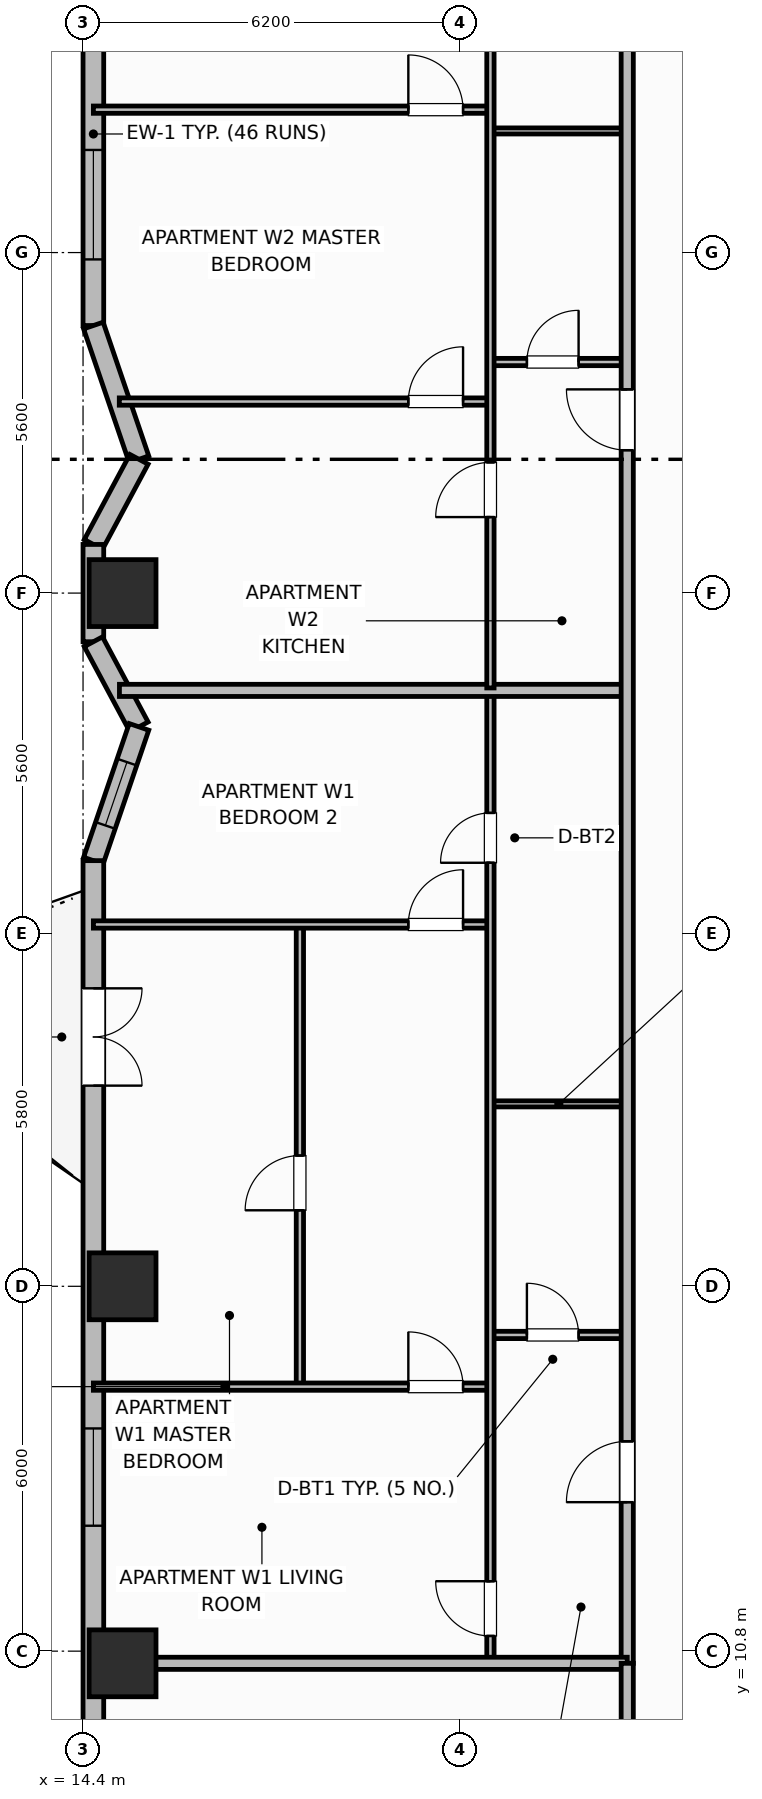
"""IFC4 building model, lengths in metres.
Left out: names, types, materials, properties, quantities, classifications, styles, units other than length and angle.
Written with IfcOpenShell. Run it as: python <this file> out.ifc"""

import sys

from ifc_helpers import new_model, si_unit, direction, frame, frame_2d, origin, origin_2d, place, context, subcontext, project, spatial, rectangle, extrude, element, fill, save


model = new_model("IFC4")
c1 = context("Model", 3, precision=1e-05, world=origin(), true_north=direction((0.0, 1.0)))
c2 = subcontext(c1, "Body", "Model", "MODEL_VIEW")
j1 = project(units=[si_unit("LENGTHUNIT", "METRE"), si_unit("PLANEANGLEUNIT", "RADIAN")], contexts=[c1])
p1 = place(None, origin())
s1 = spatial("IfcSite", under=j1, at=p1, CompositionType="ELEMENT")
p2 = place(p1, origin())
s2 = spatial("IfcBuilding", under=s1, at=p2, CompositionType="ELEMENT")
p3 = place(p2, frame((0.0, 0.0, 125.3)))
s3 = spatial("IfcBuildingStorey", under=s2, at=p3, CompositionType="ELEMENT", Elevation=125.3)
for number, where, z_axis, x_axis in (
    (1, (15.05, 10.6, 0.0), (0.0, 0.0, 1.0), (1.0, 0.0, 0.0)),
    (2, (15.05, 16.8, 0.0), (0.0, 0.0, 1.0), (1.0, 0.0, 0.0)),
    (3, (15.05, 28.2, 0.0), (0.0, 0.0, 1.0), (1.0, 0.0, 0.0)),
):
    element("IfcColumn", number, at=place(p3, frame(where, z_axis=z_axis, x_axis=x_axis)), inside=s3, PredefinedType="COLUMN", context=c2, shape_type="SweptSolid", body=[
        extrude(rectangle(XDim=1.1, YDim=1.1, at=origin_2d()), origin(), (0.0, 0.0, 1.0), 3.7),
    ])
p4 = place(p3, frame((14.57, 47.4, 0.0), z_axis=(0.0, 0.0, 1.0), x_axis=(0.0, -1.0, 0.0)))
e4 = element("IfcWall", 4, at=p4, inside=s3, PredefinedType="SOLIDWALL", context=c2, shape_type="SweptSolid", body=[
    extrude(rectangle(XDim=14.8, YDim=0.34, at=frame_2d((7.4, 0.0))), origin(), (0.0, 0.0, 1.0), 2.7),
])
p5 = place(p4, frame((3.762, 0.0, 0.73)))
e5 = element("IfcOpeningElement", 5, at=p5, cuts=e4, PredefinedType="OPENING", context=c2, shape_type="SweptSolid", body=[
    extrude(rectangle(XDim=1.8, YDim=1.85, at=frame_2d((0.9, 0.925))), frame((0.0, 0.18, 0.0), z_axis=(0.0, -1.0, 0.0), x_axis=(1.0, 0.0, 0.0)), (0.0, 0.0, 1.0), 0.36),
])
p6 = place(p4, frame((8.4, 0.0, 0.69)))
e6 = element("IfcOpeningElement", 6, at=p6, cuts=e4, PredefinedType="OPENING", context=c2, shape_type="SweptSolid", body=[
    extrude(rectangle(XDim=1.4, YDim=1.85, at=frame_2d((0.7, 0.925))), frame((0.0, 0.18, 0.0), z_axis=(0.0, -1.0, 0.0), x_axis=(1.0, 0.0, 0.0)), (0.0, 0.0, 1.0), 0.36),
])
p7 = place(p4, frame((11.913, 0.0, 0.73)))
e7 = element("IfcOpeningElement", 7, at=p7, cuts=e4, PredefinedType="OPENING", context=c2, shape_type="SweptSolid", body=[
    extrude(rectangle(XDim=1.8, YDim=1.85, at=frame_2d((0.9, 0.925))), frame((0.0, 0.18, 0.0), z_axis=(0.0, -1.0, 0.0), x_axis=(1.0, 0.0, 0.0)), (0.0, 0.0, 1.0), 0.36),
])
p8 = place(p3, frame((14.57, 32.6, 0.0), z_axis=(0.0, 0.0, 1.0), x_axis=(0.32264826586, -0.946518936175, 0.0)))
e8 = element("IfcWall", 8, at=p8, inside=s3, PredefinedType="SOLIDWALL", context=c2, shape_type="SweptSolid", body=[
    extrude(rectangle(XDim=2.324, YDim=0.34, at=frame_2d((1.162, 0.0))), origin(), (0.0, 0.0, 1.0), 2.7),
])
p9 = place(p3, frame((15.32, 30.4, 0.0), z_axis=(0.0, 0.0, 1.0), x_axis=(-0.472247007964, -0.881466257703, 0.0)))
e9 = element("IfcWall", 9, at=p9, inside=s3, PredefinedType="SOLIDWALL", context=c2, shape_type="SweptSolid", body=[
    extrude(rectangle(XDim=1.588, YDim=0.34, at=frame_2d((0.794, 0.0))), origin(), (0.0, 0.0, 1.0), 2.7),
])
p10 = place(p3, frame((14.57, 29.0, 0.0), z_axis=(0.0, 0.0, 1.0), x_axis=(0.0, -1.0, 0.0)))
e10 = element("IfcWall", 10, at=p10, inside=s3, PredefinedType="SOLIDWALL", context=c2, shape_type="SweptSolid", body=[
    extrude(rectangle(XDim=1.6, YDim=0.34, at=frame_2d((0.8, 0.0))), origin(), (0.0, 0.0, 1.0), 2.7),
])
p11 = place(p3, frame((14.57, 27.4, 0.0), z_axis=(0.0, 0.0, 1.0), x_axis=(0.472247007964, -0.881466257703, 0.0)))
e11 = element("IfcWall", 11, at=p11, inside=s3, PredefinedType="SOLIDWALL", context=c2, shape_type="SweptSolid", body=[
    extrude(rectangle(XDim=1.588, YDim=0.34, at=frame_2d((0.794, 0.0))), origin(), (0.0, 0.0, 1.0), 2.7),
])
p12 = place(p3, frame((15.32, 26.0, 0.0), z_axis=(0.0, 0.0, 1.0), x_axis=(-0.322680343871, -0.946508000853, 0.0)))
e12 = element("IfcWall", 12, at=p12, inside=s3, PredefinedType="SOLIDWALL", context=c2, shape_type="SweptSolid", body=[
    extrude(rectangle(XDim=2.324, YDim=0.34, at=frame_2d((1.162, 0.0))), origin(), (0.0, 0.0, 1.0), 2.7),
])
p13 = place(p12, frame((0.612, 0.0, 0.89)))
e13 = element("IfcOpeningElement", 13, at=p13, cuts=e12, PredefinedType="OPENING", context=c2, shape_type="SweptSolid", body=[
    extrude(rectangle(XDim=1.1, YDim=1.65, at=frame_2d((0.55, 0.825))), frame((0.0, 0.18, 0.0), z_axis=(0.0, -1.0, 0.0), x_axis=(1.0, 0.0, 0.0)), (0.0, 0.0, 1.0), 0.36),
])
p14 = place(p3, frame((14.57, 23.8, 0.0), z_axis=(0.0, 0.0, 1.0), x_axis=(0.0, -1.0, 0.0)))
e14 = element("IfcWall", 14, at=p14, inside=s3, PredefinedType="SOLIDWALL", context=c2, shape_type="SweptSolid", body=[
    extrude(rectangle(XDim=14.8, YDim=0.34, at=frame_2d((7.4, 0.0))), origin(), (0.0, 0.0, 1.0), 2.7),
])
p15 = place(p14, frame((2.1, 0.0, 0.0)))
e15 = element("IfcOpeningElement", 15, at=p15, cuts=e14, PredefinedType="OPENING", context=c2, shape_type="SweptSolid", body=[
    extrude(rectangle(XDim=1.6, YDim=2.1, at=frame_2d((0.8, 1.05))), frame((0.0, 0.18, 0.0), z_axis=(0.0, -1.0, 0.0), x_axis=(1.0, 0.0, 0.0)), (0.0, 0.0, 1.0), 0.36),
])
p16 = place(p14, frame((9.337, 0.0, 0.68)))
e16 = element("IfcOpeningElement", 16, at=p16, cuts=e14, PredefinedType="OPENING", context=c2, shape_type="SweptSolid", body=[
    extrude(rectangle(XDim=1.6, YDim=1.9, at=frame_2d((0.8, 0.95))), frame((0.0, 0.18, 0.0), z_axis=(0.0, -1.0, 0.0), x_axis=(1.0, 0.0, 0.0)), (0.0, 0.0, 1.0), 0.36),
])
p17 = place(p3, frame((21.1, 16.0, 0.0), z_axis=(0.0, 0.0, 1.0), x_axis=(1.0, 0.0, 0.0)))
e17 = element("IfcWall", 17, at=p17, inside=s3, PredefinedType="PARTITIONING", context=c2, shape_type="SweptSolid", body=[
    extrude(rectangle(XDim=2.25, YDim=0.12, at=frame_2d((1.125, 0.0))), origin(), (0.0, 0.0, 1.0), 2.53),
])
p18 = place(p17, frame((0.6, 0.0, 0.0)))
e18 = element("IfcOpeningElement", 18, at=p18, cuts=e17, PredefinedType="OPENING", context=c2, shape_type="SweptSolid", body=[
    extrude(rectangle(XDim=0.85, YDim=2.1, at=frame_2d((0.425, 1.05))), frame((0.0, 0.07, 0.0), z_axis=(0.0, -1.0, 0.0), x_axis=(1.0, 0.0, 0.0)), (0.0, 0.0, 1.0), 0.14),
])
p19 = place(p3, frame((21.1, 19.8, 0.0), z_axis=(0.0, 0.0, 1.0), x_axis=(1.0, 0.0, 0.0)))
e19 = element("IfcWall", 19, at=p19, inside=s3, PredefinedType="PARTITIONING", context=c2, shape_type="SweptSolid", body=[
    extrude(rectangle(XDim=2.25, YDim=0.1, at=frame_2d((1.125, 0.0))), origin(), (0.0, 0.0, 1.0), 2.53),
])
p20 = place(p3, frame((17.966, 15.19, 0.0), z_axis=(0.0, 0.0, 1.0), x_axis=(0.0, 1.0, 0.0)))
e20 = element("IfcWall", 20, at=p20, inside=s3, PredefinedType="PARTITIONING", context=c2, shape_type="SweptSolid", body=[
    extrude(rectangle(XDim=7.52, YDim=0.12, at=frame_2d((3.76, 0.0))), origin(), (0.0, 0.0, 1.0), 2.53),
])
p21 = place(p20, frame((2.86, 0.0, 0.0)))
e21 = element("IfcOpeningElement", 21, at=p21, cuts=e20, PredefinedType="OPENING", context=c2, shape_type="SweptSolid", body=[
    extrude(rectangle(XDim=0.9, YDim=2.1, at=frame_2d((0.45, 1.05))), frame((0.0, 0.07, 0.0), z_axis=(0.0, -1.0, 0.0), x_axis=(1.0, 0.0, 0.0)), (0.0, 0.0, 1.0), 0.14),
])
p22 = place(p3, frame((14.57, 15.15, 0.0), z_axis=(0.0, 0.0, 1.0), x_axis=(1.0, 0.0, 0.0)))
e22 = element("IfcWall", 22, at=p22, inside=s3, PredefinedType="PARTITIONING", context=c2, shape_type="SweptSolid", body=[
    extrude(rectangle(XDim=6.53, YDim=0.12, at=frame_2d((3.265, 0.0))), origin(), (0.0, 0.0, 1.0), 2.53),
])
p23 = place(p22, frame((5.18, 0.0, 0.0)))
e23 = element("IfcOpeningElement", 23, at=p23, cuts=e22, PredefinedType="OPENING", context=c2, shape_type="SweptSolid", body=[
    extrude(rectangle(XDim=0.9, YDim=2.1, at=frame_2d((0.45, 1.05))), frame((0.0, 0.07, 0.0), z_axis=(0.0, -1.0, 0.0), x_axis=(1.0, 0.0, 0.0)), (0.0, 0.0, 1.0), 0.14),
])
p24 = place(p3, frame((14.57, 22.75, 0.0), z_axis=(0.0, 0.0, 1.0), x_axis=(1.0, 0.0, 0.0)))
e24 = element("IfcWall", 24, at=p24, inside=s3, PredefinedType="PARTITIONING", context=c2, shape_type="SweptSolid", body=[
    extrude(rectangle(XDim=6.53, YDim=0.12, at=frame_2d((3.265, 0.0))), origin(), (0.0, 0.0, 1.0), 2.53),
])
p25 = place(p24, frame((5.18, 0.0, 0.0)))
e25 = element("IfcOpeningElement", 25, at=p25, cuts=e24, PredefinedType="OPENING", context=c2, shape_type="SweptSolid", body=[
    extrude(rectangle(XDim=0.9, YDim=2.1, at=frame_2d((0.45, 1.05))), frame((0.0, 0.07, 0.0), z_axis=(0.0, -1.0, 0.0), x_axis=(1.0, 0.0, 0.0)), (0.0, 0.0, 1.0), 0.14),
])
p26 = place(p3, frame((21.1, 10.64, 0.0), z_axis=(0.0, 0.0, 1.0), x_axis=(0.0, 1.0, 0.0)))
e26 = element("IfcWall", 26, at=p26, inside=s3, PredefinedType="PARTITIONING", context=c2, shape_type="SweptSolid", body=[
    extrude(rectangle(XDim=15.92, YDim=0.12, at=frame_2d((7.96, 0.0))), origin(), (0.0, 0.0, 1.0), 2.53),
])
p27 = place(p26, frame((0.41, 0.0, 0.0)))
e27 = element("IfcOpeningElement", 27, at=p27, cuts=e26, PredefinedType="OPENING", context=c2, shape_type="SweptSolid", body=[
    extrude(rectangle(XDim=0.9, YDim=2.1, at=frame_2d((0.45, 1.05))), frame((0.0, 0.07, 0.0), z_axis=(0.0, -1.0, 0.0), x_axis=(1.0, 0.0, 0.0)), (0.0, 0.0, 1.0), 0.14),
])
p28 = place(p26, frame((13.125, 0.0, 0.0)))
e28 = element("IfcOpeningElement", 28, at=p28, cuts=e26, PredefinedType="OPENING", context=c2, shape_type="SweptSolid", body=[
    extrude(rectangle(XDim=0.82, YDim=2.08, at=frame_2d((0.41, 1.04))), frame((0.0, 0.07, 0.0), z_axis=(0.0, -1.0, 0.0), x_axis=(1.0, 0.0, 0.0)), (0.0, 0.0, 1.0), 0.14),
])
p29 = place(p3, frame((14.999, 26.6, 0.0), z_axis=(0.0, 0.0, 1.0), x_axis=(1.0, 0.0, 0.0)))
e29 = element("IfcWall", 29, at=p29, inside=s3, PredefinedType="PARTITIONING", context=c2, shape_type="SweptSolid", body=[
    extrude(rectangle(XDim=8.352, YDim=0.2, at=frame_2d((4.176, 0.0))), origin(), (0.0, 0.0, 1.0), 2.53),
])
p30 = place(p3, frame((21.1, 32.0, 0.0), z_axis=(0.0, 0.0, 1.0), x_axis=(1.0, 0.0, 0.0)))
e30 = element("IfcWall", 30, at=p30, inside=s3, PredefinedType="PARTITIONING", context=c2, shape_type="SweptSolid", body=[
    extrude(rectangle(XDim=2.25, YDim=0.12, at=frame_2d((1.125, 0.0))), origin(), (0.0, 0.0, 1.0), 2.53),
])
p31 = place(p30, frame((0.6, 0.0, 0.0)))
e31 = element("IfcOpeningElement", 31, at=p31, cuts=e30, PredefinedType="OPENING", context=c2, shape_type="SweptSolid", body=[
    extrude(rectangle(XDim=0.85, YDim=2.1, at=frame_2d((0.425, 1.05))), frame((0.0, 0.07, 0.0), z_axis=(0.0, -1.0, 0.0), x_axis=(1.0, 0.0, 0.0)), (0.0, 0.0, 1.0), 0.14),
])
p32 = place(p3, frame((21.1, 35.8, 0.0), z_axis=(0.0, 0.0, 1.0), x_axis=(1.0, 0.0, 0.0)))
e32 = element("IfcWall", 32, at=p32, inside=s3, PredefinedType="PARTITIONING", context=c2, shape_type="SweptSolid", body=[
    extrude(rectangle(XDim=2.25, YDim=0.1, at=frame_2d((1.125, 0.0))), origin(), (0.0, 0.0, 1.0), 2.53),
])
p33 = place(p3, frame((14.996, 31.35, 0.0), z_axis=(0.0, 0.0, 1.0), x_axis=(1.0, 0.0, 0.0)))
e33 = element("IfcWall", 33, at=p33, inside=s3, PredefinedType="PARTITIONING", context=c2, shape_type="SweptSolid", body=[
    extrude(rectangle(XDim=6.104, YDim=0.12, at=frame_2d((3.052, 0.0))), origin(), (0.0, 0.0, 1.0), 2.53),
])
p34 = place(p33, frame((4.754, 0.0, 0.0)))
e34 = element("IfcOpeningElement", 34, at=p34, cuts=e33, PredefinedType="OPENING", context=c2, shape_type="SweptSolid", body=[
    extrude(rectangle(XDim=0.9, YDim=2.1, at=frame_2d((0.45, 1.05))), frame((0.0, 0.07, 0.0), z_axis=(0.0, -1.0, 0.0), x_axis=(1.0, 0.0, 0.0)), (0.0, 0.0, 1.0), 0.14),
])
p35 = place(p3, frame((14.57, 36.15, 0.0), z_axis=(0.0, 0.0, 1.0), x_axis=(1.0, 0.0, 0.0)))
e35 = element("IfcWall", 35, at=p35, inside=s3, PredefinedType="PARTITIONING", context=c2, shape_type="SweptSolid", body=[
    extrude(rectangle(XDim=6.53, YDim=0.12, at=frame_2d((3.265, 0.0))), origin(), (0.0, 0.0, 1.0), 2.53),
])
p36 = place(p35, frame((5.18, 0.0, 0.0)))
e36 = element("IfcOpeningElement", 36, at=p36, cuts=e35, PredefinedType="OPENING", context=c2, shape_type="SweptSolid", body=[
    extrude(rectangle(XDim=0.9, YDim=2.1, at=frame_2d((0.45, 1.05))), frame((0.0, 0.07, 0.0), z_axis=(0.0, -1.0, 0.0), x_axis=(1.0, 0.0, 0.0)), (0.0, 0.0, 1.0), 0.14),
])
p37 = place(p3, frame((21.1, 26.64, 0.0), z_axis=(0.0, 0.0, 1.0), x_axis=(0.0, 1.0, 0.0)))
e37 = element("IfcWall", 37, at=p37, inside=s3, PredefinedType="PARTITIONING", context=c2, shape_type="SweptSolid", body=[
    extrude(rectangle(XDim=19.12, YDim=0.12, at=frame_2d((9.56, 0.0))), origin(), (0.0, 0.0, 1.0), 2.53),
])
p38 = place(p37, frame((2.81, 0.0, 0.0)))
e38 = element("IfcOpeningElement", 38, at=p38, cuts=e37, PredefinedType="OPENING", context=c2, shape_type="SweptSolid", body=[
    extrude(rectangle(XDim=0.9, YDim=2.1, at=frame_2d((0.45, 1.05))), frame((0.0, 0.07, 0.0), z_axis=(0.0, -1.0, 0.0), x_axis=(1.0, 0.0, 0.0)), (0.0, 0.0, 1.0), 0.14),
])
p39 = place(p37, frame((16.18, 0.0, 0.0)))
e39 = element("IfcOpeningElement", 39, at=p39, cuts=e37, PredefinedType="OPENING", context=c2, shape_type="SweptSolid", body=[
    extrude(rectangle(XDim=0.82, YDim=2.08, at=frame_2d((0.41, 1.04))), frame((0.0, 0.07, 0.0), z_axis=(0.0, -1.0, 0.0), x_axis=(1.0, 0.0, 0.0)), (0.0, 0.0, 1.0), 0.14),
])
p40 = place(p3, frame((23.35, 10.6, 0.0), z_axis=(0.0, 0.0, 1.0), x_axis=(0.0, 1.0, 0.0)))
e40 = element("IfcWall", 40, at=p40, inside=s3, PredefinedType="PARTITIONING", context=c2, shape_type="SweptSolid", body=[
    extrude(rectangle(XDim=35.2, YDim=0.2, at=frame_2d((17.6, 0.0))), origin(), (0.0, 0.0, 1.0), 2.53),
])
p41 = place(p40, frame((2.65, 0.0, 0.0)))
e41 = element("IfcOpeningElement", 41, at=p41, cuts=e40, PredefinedType="OPENING", context=c2, shape_type="SweptSolid", body=[
    extrude(rectangle(XDim=1.0, YDim=2.15, at=frame_2d((0.5, 1.075))), frame((0.0, 0.11, 0.0), z_axis=(0.0, -1.0, 0.0), x_axis=(1.0, 0.0, 0.0)), (0.0, 0.0, 1.0), 0.22),
])
p42 = place(p40, frame((19.95, 0.0, 0.0)))
e42 = element("IfcOpeningElement", 42, at=p42, cuts=e40, PredefinedType="OPENING", context=c2, shape_type="SweptSolid", body=[
    extrude(rectangle(XDim=1.0, YDim=2.15, at=frame_2d((0.5, 1.075))), frame((0.0, 0.11, 0.0), z_axis=(0.0, -1.0, 0.0), x_axis=(1.0, 0.0, 0.0)), (0.0, 0.0, 1.0), 0.22),
])
p43 = place(p3, frame((14.99, 10.6, 0.0), z_axis=(0.0, 0.0, 1.0), x_axis=(1.0, 0.0, 0.0)))
e43 = element("IfcWall", 43, at=p43, inside=s3, PredefinedType="PARTITIONING", context=c2, shape_type="SweptSolid", body=[
    extrude(rectangle(XDim=8.36, YDim=0.2, at=frame_2d((4.18, 0.0))), origin(), (0.0, 0.0, 1.0), 2.53),
])
p44 = place(p3, frame((23.35, 4.97, 0.0), z_axis=(0.0, 0.0, 1.0), x_axis=(0.0, 1.0, 0.0)))
e44 = element("IfcWall", 44, at=p44, inside=s3, PredefinedType="PARTITIONING", context=c2, shape_type="SweptSolid", body=[
    extrude(rectangle(XDim=5.63, YDim=0.2, at=frame_2d((2.815, 0.0))), origin(), (0.0, 0.0, 1.0), 2.53),
])
p45 = place(p7, origin())
e45 = element("IfcWindow", 45, at=p45, inside=s3, PartitioningType="SINGLE_PANEL", PredefinedType="WINDOW", context=c2, shape_type="SweptSolid", body=[
    extrude(rectangle(XDim=1.8, YDim=1.85, at=frame_2d((0.9, 0.925))), frame((0.0, 0.03, 0.0), z_axis=(0.0, -1.0, 0.0), x_axis=(1.0, 0.0, 0.0)), (0.0, 0.0, 1.0), 0.06),
])
fill(e7, e45)
p46 = place(p13, origin())
e46 = element("IfcWindow", 46, at=p46, inside=s3, PartitioningType="SINGLE_PANEL", PredefinedType="WINDOW", context=c2, shape_type="SweptSolid", body=[
    extrude(rectangle(XDim=1.1, YDim=1.65, at=frame_2d((0.55, 0.825))), frame((0.0, 0.03, 0.0), z_axis=(0.0, -1.0, 0.0), x_axis=(1.0, 0.0, 0.0)), (0.0, 0.0, 1.0), 0.06),
])
fill(e13, e46)
p47 = place(p15, origin())
e47 = element("IfcDoor", 47, at=p47, inside=s3, OperationType="DOUBLE_DOOR_SINGLE_SWING", PredefinedType="DOOR", context=c2, shape_type="SweptSolid", body=[
    extrude(rectangle(XDim=1.6, YDim=2.1, at=frame_2d((0.8, 1.05))), frame((0.0, 0.025, 0.0), z_axis=(0.0, -1.0, 0.0), x_axis=(1.0, 0.0, 0.0)), (0.0, 0.0, 1.0), 0.05),
])
fill(e15, e47)
p48 = place(p16, origin())
e48 = element("IfcWindow", 48, at=p48, inside=s3, PartitioningType="SINGLE_PANEL", PredefinedType="WINDOW", context=c2, shape_type="SweptSolid", body=[
    extrude(rectangle(XDim=1.6, YDim=1.9, at=frame_2d((0.8, 0.95))), frame((0.0, 0.03, 0.0), z_axis=(0.0, -1.0, 0.0), x_axis=(1.0, 0.0, 0.0)), (0.0, 0.0, 1.0), 0.06),
])
fill(e16, e48)
p49 = place(p18, origin())
e49 = element("IfcDoor", 49, at=p49, inside=s3, OperationType="SINGLE_SWING_LEFT", PredefinedType="DOOR", context=c2, shape_type="SweptSolid", body=[
    extrude(rectangle(XDim=0.85, YDim=2.1, at=frame_2d((0.425, 1.05))), frame((0.0, 0.025, 0.0), z_axis=(0.0, -1.0, 0.0), x_axis=(1.0, 0.0, 0.0)), (0.0, 0.0, 1.0), 0.05),
])
fill(e18, e49)
p50 = place(p21, origin())
e50 = element("IfcDoor", 50, at=p50, inside=s3, OperationType="SINGLE_SWING_LEFT", PredefinedType="DOOR", context=c2, shape_type="SweptSolid", body=[
    extrude(rectangle(XDim=0.9, YDim=2.1, at=frame_2d((0.45, 1.05))), frame((0.0, 0.025, 0.0), z_axis=(0.0, -1.0, 0.0), x_axis=(1.0, 0.0, 0.0)), (0.0, 0.0, 1.0), 0.05),
])
fill(e21, e50)
p51 = place(p23, origin())
e51 = element("IfcDoor", 51, at=p51, inside=s3, OperationType="SINGLE_SWING_LEFT", PredefinedType="DOOR", context=c2, shape_type="SweptSolid", body=[
    extrude(rectangle(XDim=0.9, YDim=2.1, at=frame_2d((0.45, 1.05))), frame((0.0, 0.025, 0.0), z_axis=(0.0, -1.0, 0.0), x_axis=(1.0, 0.0, 0.0)), (0.0, 0.0, 1.0), 0.05),
])
fill(e23, e51)
p52 = place(p25, origin())
e52 = element("IfcDoor", 52, at=p52, inside=s3, OperationType="SINGLE_SWING_RIGHT", PredefinedType="DOOR", context=c2, shape_type="SweptSolid", body=[
    extrude(rectangle(XDim=0.9, YDim=2.1, at=frame_2d((0.45, 1.05))), frame((0.0, 0.025, 0.0), z_axis=(0.0, -1.0, 0.0), x_axis=(1.0, 0.0, 0.0)), (0.0, 0.0, 1.0), 0.05),
])
fill(e25, e52)
p53 = place(p27, origin())
e53 = element("IfcDoor", 53, at=p53, inside=s3, OperationType="SINGLE_SWING_RIGHT", PredefinedType="DOOR", context=c2, shape_type="SweptSolid", body=[
    extrude(rectangle(XDim=0.9, YDim=2.1, at=frame_2d((0.45, 1.05))), frame((0.0, 0.025, 0.0), z_axis=(0.0, -1.0, 0.0), x_axis=(1.0, 0.0, 0.0)), (0.0, 0.0, 1.0), 0.05),
])
fill(e27, e53)
p54 = place(p28, origin())
e54 = element("IfcDoor", 54, at=p54, inside=s3, OperationType="SINGLE_SWING_LEFT", PredefinedType="DOOR", context=c2, shape_type="SweptSolid", body=[
    extrude(rectangle(XDim=0.82, YDim=2.08, at=frame_2d((0.41, 1.04))), frame((0.0, 0.025, 0.0), z_axis=(0.0, -1.0, 0.0), x_axis=(1.0, 0.0, 0.0)), (0.0, 0.0, 1.0), 0.05),
])
fill(e28, e54)
p55 = place(p31, origin())
e55 = element("IfcDoor", 55, at=p55, inside=s3, OperationType="SINGLE_SWING_RIGHT", PredefinedType="DOOR", context=c2, shape_type="SweptSolid", body=[
    extrude(rectangle(XDim=0.85, YDim=2.1, at=frame_2d((0.425, 1.05))), frame((0.0, 0.025, 0.0), z_axis=(0.0, -1.0, 0.0), x_axis=(1.0, 0.0, 0.0)), (0.0, 0.0, 1.0), 0.05),
])
fill(e31, e55)
p56 = place(p34, origin())
e56 = element("IfcDoor", 56, at=p56, inside=s3, OperationType="SINGLE_SWING_RIGHT", PredefinedType="DOOR", context=c2, shape_type="SweptSolid", body=[
    extrude(rectangle(XDim=0.9, YDim=2.1, at=frame_2d((0.45, 1.05))), frame((0.0, 0.025, 0.0), z_axis=(0.0, -1.0, 0.0), x_axis=(1.0, 0.0, 0.0)), (0.0, 0.0, 1.0), 0.05),
])
fill(e34, e56)
p57 = place(p36, origin())
e57 = element("IfcDoor", 57, at=p57, inside=s3, OperationType="SINGLE_SWING_LEFT", PredefinedType="DOOR", context=c2, shape_type="SweptSolid", body=[
    extrude(rectangle(XDim=0.9, YDim=2.1, at=frame_2d((0.45, 1.05))), frame((0.0, 0.025, 0.0), z_axis=(0.0, -1.0, 0.0), x_axis=(1.0, 0.0, 0.0)), (0.0, 0.0, 1.0), 0.05),
])
fill(e36, e57)
p58 = place(p38, origin())
e58 = element("IfcDoor", 58, at=p58, inside=s3, OperationType="SINGLE_SWING_LEFT", PredefinedType="DOOR", context=c2, shape_type="SweptSolid", body=[
    extrude(rectangle(XDim=0.9, YDim=2.1, at=frame_2d((0.45, 1.05))), frame((0.0, 0.025, 0.0), z_axis=(0.0, -1.0, 0.0), x_axis=(1.0, 0.0, 0.0)), (0.0, 0.0, 1.0), 0.05),
])
fill(e38, e58)
p59 = place(p41, origin())
e59 = element("IfcDoor", 59, at=p59, inside=s3, OperationType="SINGLE_SWING_LEFT", PredefinedType="DOOR", context=c2, shape_type="SweptSolid", body=[
    extrude(rectangle(XDim=1.0, YDim=2.15, at=frame_2d((0.5, 1.075))), frame((0.0, 0.025, 0.0), z_axis=(0.0, -1.0, 0.0), x_axis=(1.0, 0.0, 0.0)), (0.0, 0.0, 1.0), 0.05),
])
fill(e41, e59)
p60 = place(p42, origin())
e60 = element("IfcDoor", 60, at=p60, inside=s3, OperationType="SINGLE_SWING_RIGHT", PredefinedType="DOOR", context=c2, shape_type="SweptSolid", body=[
    extrude(rectangle(XDim=1.0, YDim=2.15, at=frame_2d((0.5, 1.075))), frame((0.0, 0.025, 0.0), z_axis=(0.0, -1.0, 0.0), x_axis=(1.0, 0.0, 0.0)), (0.0, 0.0, 1.0), 0.05),
])
fill(e42, e60)
save(model, sys.argv[1])
